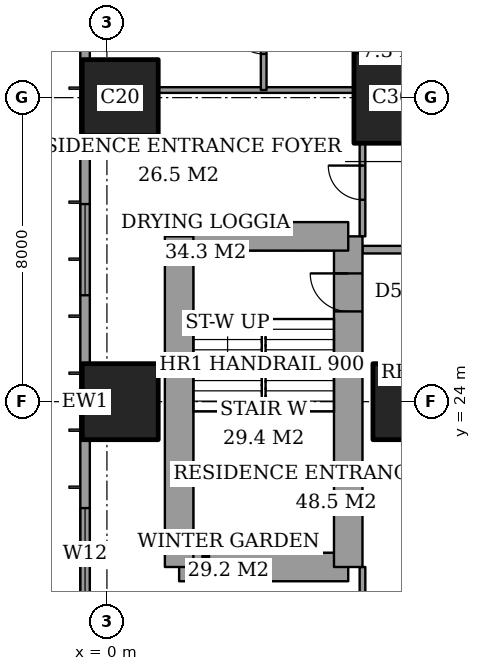
"""IFC4 building model, lengths in metres.
Left out: names, types, materials, properties, quantities, classifications, styles, units other than length and angle.
Written with IfcOpenShell. Run it as: python <this file> out.ifc"""

import sys

from ifc_helpers import new_model, si_unit, direction, frame, frame_2d, origin, origin_2d, place, context, subcontext, project, spatial, rectangle, extrude, element, fill, save


model = new_model("IFC4")
c1 = context("Model", 3, precision=1e-05, world=origin(), true_north=direction((0.0, 1.0)))
c2 = subcontext(c1, "Body", "Model", "MODEL_VIEW")
j1 = project(units=[si_unit("LENGTHUNIT", "METRE"), si_unit("PLANEANGLEUNIT", "RADIAN")], contexts=[c1])
p1 = place(None, origin())
s1 = spatial("IfcSite", under=j1, at=p1, CompositionType="ELEMENT")
p2 = place(p1, origin())
s2 = spatial("IfcBuilding", under=s1, at=p2, CompositionType="ELEMENT")
p3 = place(p2, frame((0.0, 0.0, 139.4)))
s3 = spatial("IfcBuildingStorey", under=s2, at=p3, CompositionType="ELEMENT", Elevation=139.4)
for number, where, z_axis, x_axis in (
    (1, (0.35, 24.0, 0.0), (0.0, 0.0, 1.0), (1.0, 0.0, 0.0)),
    (2, (0.35, 32.0, 0.0), (0.0, 0.0, 1.0), (1.0, 0.0, 0.0)),
    (3, (8.0, 24.0, 0.0), (0.0, 0.0, 1.0), (1.0, 0.0, 0.0)),
):
    element("IfcColumn", number, at=place(p3, frame(where, z_axis=z_axis, x_axis=x_axis)), inside=s3, PredefinedType="COLUMN", context=c2, shape_type="SweptSolid", body=[
        extrude(rectangle(XDim=2.0, YDim=2.0, at=origin_2d()), origin(), (0.0, 0.0, 1.0), 3.6),
    ])
p4 = place(p3, frame((8.0, 32.0, 0.0), z_axis=(0.0, 0.0, 1.0), x_axis=(1.0, 0.0, 0.0)))
e4 = element("IfcColumn", 4, at=p4, inside=s3, PredefinedType="COLUMN", context=c2, shape_type="SweptSolid", body=[
    extrude(rectangle(XDim=3.0, YDim=2.4, at=origin_2d()), origin(), (0.0, 0.0, 1.0), 3.6),
])
p5 = place(p3, frame((1.9, 19.65, 0.0), z_axis=(0.0, 0.0, 1.0), x_axis=(1.0, 0.0, 0.0)))
e5 = element("IfcWall", 5, at=p5, inside=s3, PredefinedType="SHEAR", context=c2, shape_type="SweptSolid", body=[
    extrude(rectangle(XDim=4.45, YDim=0.75, at=frame_2d((2.225, 0.0))), origin(), (0.0, 0.0, 1.0), 3.6),
])
p6 = place(p3, frame((6.35, 19.65, 0.0), z_axis=(0.0, 0.0, 1.0), x_axis=(0.0, 1.0, 0.0)))
e6 = element("IfcWall", 6, at=p6, inside=s3, PredefinedType="SHEAR", context=c2, shape_type="SweptSolid", body=[
    extrude(rectangle(XDim=8.7, YDim=0.75, at=frame_2d((4.35, 0.0))), origin(), (0.0, 0.0, 1.0), 3.6),
])
p7 = place(p6, frame((6.725, 0.0, 0.0)))
e7 = element("IfcOpeningElement", 7, at=p7, cuts=e6, PredefinedType="OPENING", context=c2, shape_type="SweptSolid", body=[
    extrude(rectangle(XDim=1.0, YDim=2.1, at=frame_2d((0.5, 1.05))), frame((0.0, 0.385, 0.0), z_axis=(0.0, -1.0, 0.0), x_axis=(1.0, 0.0, 0.0)), (0.0, 0.0, 1.0), 0.77),
])
p8 = place(p3, frame((6.35, 28.35, 0.0), z_axis=(0.0, 0.0, 1.0), x_axis=(-1.0, 0.0, 0.0)))
e8 = element("IfcWall", 8, at=p8, inside=s3, PredefinedType="SHEAR", context=c2, shape_type="SweptSolid", body=[
    extrude(rectangle(XDim=4.45, YDim=0.75, at=frame_2d((2.225, 0.0))), origin(), (0.0, 0.0, 1.0), 3.6),
])
p9 = place(p3, frame((1.9, 28.35, 0.0), z_axis=(0.0, 0.0, 1.0), x_axis=(0.0, -1.0, 0.0)))
e9 = element("IfcWall", 9, at=p9, inside=s3, PredefinedType="SHEAR", context=c2, shape_type="SweptSolid", body=[
    extrude(rectangle(XDim=8.7, YDim=0.75, at=frame_2d((4.35, 0.0))), origin(), (0.0, 0.0, 1.0), 3.6),
])
p10 = place(p3, frame((-0.575, 44.825, 0.0), z_axis=(0.0, 0.0, 1.0), x_axis=(0.0, -1.0, 0.0)))
e10 = element("IfcWall", 10, at=p10, inside=s3, PredefinedType="SOLIDWALL", context=c2, shape_type="SweptSolid", body=[
    extrude(rectangle(XDim=41.65, YDim=0.25, at=frame_2d((20.825, 0.0))), origin(), (0.0, 0.0, 1.0), 3.6),
])
p11 = place(p10, frame((0.775, 0.0, 0.4)))
e11 = element("IfcOpeningElement", 11, at=p11, cuts=e10, PredefinedType="OPENING", context=c2, shape_type="SweptSolid", body=[
    extrude(rectangle(XDim=2.4, YDim=2.2, at=frame_2d((1.2, 1.1))), frame((0.0, 0.135, 0.0), z_axis=(0.0, -1.0, 0.0), x_axis=(1.0, 0.0, 0.0)), (0.0, 0.0, 1.0), 0.27),
])
p12 = place(p10, frame((6.1, 0.0, 0.4)))
e12 = element("IfcOpeningElement", 12, at=p12, cuts=e10, PredefinedType="OPENING", context=c2, shape_type="SweptSolid", body=[
    extrude(rectangle(XDim=1.2, YDim=2.2, at=frame_2d((0.6, 1.1))), frame((0.0, 0.135, 0.0), z_axis=(0.0, -1.0, 0.0), x_axis=(1.0, 0.0, 0.0)), (0.0, 0.0, 1.0), 0.27),
])
p13 = place(p10, frame((8.425, 0.0, 0.4)))
e13 = element("IfcOpeningElement", 13, at=p13, cuts=e10, PredefinedType="OPENING", context=c2, shape_type="SweptSolid", body=[
    extrude(rectangle(XDim=2.4, YDim=2.2, at=frame_2d((1.2, 1.1))), frame((0.0, 0.135, 0.0), z_axis=(0.0, -1.0, 0.0), x_axis=(1.0, 0.0, 0.0)), (0.0, 0.0, 1.0), 0.27),
])
p14 = place(p10, frame((15.625, 0.0, 0.4)))
e14 = element("IfcOpeningElement", 14, at=p14, cuts=e10, PredefinedType="OPENING", context=c2, shape_type="SweptSolid", body=[
    extrude(rectangle(XDim=2.4, YDim=2.2, at=frame_2d((1.2, 1.1))), frame((0.0, 0.135, 0.0), z_axis=(0.0, -1.0, 0.0), x_axis=(1.0, 0.0, 0.0)), (0.0, 0.0, 1.0), 0.27),
])
p15 = place(p10, frame((23.625, 0.0, 0.4)))
e15 = element("IfcOpeningElement", 15, at=p15, cuts=e10, PredefinedType="OPENING", context=c2, shape_type="SweptSolid", body=[
    extrude(rectangle(XDim=2.4, YDim=2.2, at=frame_2d((1.2, 1.1))), frame((0.0, 0.135, 0.0), z_axis=(0.0, -1.0, 0.0), x_axis=(1.0, 0.0, 0.0)), (0.0, 0.0, 1.0), 0.27),
])
p16 = place(p10, frame((30.825, 0.0, 0.4)))
e16 = element("IfcOpeningElement", 16, at=p16, cuts=e10, PredefinedType="OPENING", context=c2, shape_type="SweptSolid", body=[
    extrude(rectangle(XDim=2.4, YDim=2.2, at=frame_2d((1.2, 1.1))), frame((0.0, 0.135, 0.0), z_axis=(0.0, -1.0, 0.0), x_axis=(1.0, 0.0, 0.0)), (0.0, 0.0, 1.0), 0.27),
])
p17 = place(p10, frame((34.5, 0.0, 0.4)))
e17 = element("IfcOpeningElement", 17, at=p17, cuts=e10, PredefinedType="OPENING", context=c2, shape_type="SweptSolid", body=[
    extrude(rectangle(XDim=1.2, YDim=2.2, at=frame_2d((0.6, 1.1))), frame((0.0, 0.135, 0.0), z_axis=(0.0, -1.0, 0.0), x_axis=(1.0, 0.0, 0.0)), (0.0, 0.0, 1.0), 0.27),
])
p18 = place(p10, frame((38.475, 0.0, 0.4)))
e18 = element("IfcOpeningElement", 18, at=p18, cuts=e10, PredefinedType="OPENING", context=c2, shape_type="SweptSolid", body=[
    extrude(rectangle(XDim=2.4, YDim=2.2, at=frame_2d((1.2, 1.1))), frame((0.0, 0.135, 0.0), z_axis=(0.0, -1.0, 0.0), x_axis=(1.0, 0.0, 0.0)), (0.0, 0.0, 1.0), 0.27),
])
p19 = place(p3, frame((6.725, 28.0, 0.0), z_axis=(0.0, 0.0, 1.0), x_axis=(1.0, 0.0, 0.0)))
e19 = element("IfcWall", 19, at=p19, inside=s3, PredefinedType="PARTITIONING", context=c2, shape_type="SweptSolid", body=[
    extrude(rectangle(XDim=17.275, YDim=0.2, at=frame_2d((8.637, 0.0))), origin(), (0.0, 0.0, 1.0), 3.35),
])
p20 = place(p19, frame((6.675, 0.0, 0.0)))
e20 = element("IfcOpeningElement", 20, at=p20, cuts=e19, PredefinedType="OPENING", context=c2, shape_type="SweptSolid", body=[
    extrude(rectangle(XDim=1.2, YDim=2.4, at=frame_2d((0.6, 1.2))), frame((0.0, 0.11, 0.0), z_axis=(0.0, -1.0, 0.0), x_axis=(1.0, 0.0, 0.0)), (0.0, 0.0, 1.0), 0.22),
])
p21 = place(p3, frame((1.35, 32.2, 0.0), z_axis=(0.0, 0.0, 1.0), x_axis=(1.0, 0.0, 0.0)))
e21 = element("IfcWall", 21, at=p21, inside=s3, PredefinedType="PARTITIONING", context=c2, shape_type="SweptSolid", body=[
    extrude(rectangle(XDim=5.15, YDim=0.15, at=frame_2d((2.575, 0.0))), origin(), (0.0, 0.0, 1.0), 3.35),
])
p22 = place(p3, frame((4.125, 32.2, 0.0), z_axis=(0.0, 0.0, 1.0), x_axis=(0.0, 1.0, 0.0)))
e22 = element("IfcWall", 22, at=p22, inside=s3, PredefinedType="PARTITIONING", context=c2, shape_type="SweptSolid", body=[
    extrude(rectangle(XDim=2.8, YDim=0.15, at=frame_2d((1.4, 0.0))), origin(), (0.0, 0.0, 1.0), 3.35),
])
p23 = place(p22, frame((0.95, 0.0, 0.0)))
e23 = element("IfcOpeningElement", 23, at=p23, cuts=e22, PredefinedType="OPENING", context=c2, shape_type="SweptSolid", body=[
    extrude(rectangle(XDim=0.9, YDim=2.1, at=frame_2d((0.45, 1.05))), frame((0.0, 0.085, 0.0), z_axis=(0.0, -1.0, 0.0), x_axis=(1.0, 0.0, 0.0)), (0.0, 0.0, 1.0), 0.17),
])
p24 = place(p3, frame((6.725, 17.2, 0.0), z_axis=(0.0, 0.0, 1.0), x_axis=(0.0, 1.0, 0.0)))
e24 = element("IfcWall", 24, at=p24, inside=s3, PredefinedType="PARTITIONING", context=c2, shape_type="SweptSolid", body=[
    extrude(rectangle(XDim=2.45, YDim=0.15, at=frame_2d((1.225, 0.0))), origin(), (0.0, 0.0, 1.0), 3.35),
])
p25 = place(p24, frame((0.538, 0.0, 0.0)))
e25 = element("IfcOpeningElement", 25, at=p25, cuts=e24, PredefinedType="OPENING", context=c2, shape_type="SweptSolid", body=[
    extrude(rectangle(XDim=1.0, YDim=2.1, at=frame_2d((0.5, 1.05))), frame((0.0, 0.085, 0.0), z_axis=(0.0, -1.0, 0.0), x_axis=(1.0, 0.0, 0.0)), (0.0, 0.0, 1.0), 0.17),
])
p26 = place(p3, frame((6.725, 28.35, 0.0), z_axis=(0.0, 0.0, 1.0), x_axis=(0.0, 1.0, 0.0)))
e26 = element("IfcWall", 26, at=p26, inside=s3, PredefinedType="PARTITIONING", context=c2, shape_type="SweptSolid", body=[
    extrude(rectangle(XDim=2.45, YDim=0.15, at=frame_2d((1.225, 0.0))), origin(), (0.0, 0.0, 1.0), 3.35),
])
p27 = place(p26, frame((0.962, 0.0, 0.0)))
e27 = element("IfcOpeningElement", 27, at=p27, cuts=e26, PredefinedType="OPENING", context=c2, shape_type="SweptSolid", body=[
    extrude(rectangle(XDim=0.9, YDim=2.1, at=frame_2d((0.45, 1.05))), frame((0.0, 0.085, 0.0), z_axis=(0.0, -1.0, 0.0), x_axis=(1.0, 0.0, 0.0)), (0.0, 0.0, 1.0), 0.17),
])
p28 = place(p14, origin())
e28 = element("IfcWindow", 28, at=p28, inside=s3, PartitioningType="SINGLE_PANEL", PredefinedType="WINDOW", context=c2, shape_type="SweptSolid", body=[
    extrude(rectangle(XDim=2.4, YDim=2.2, at=frame_2d((1.2, 1.1))), frame((0.0, 0.03, 0.0), z_axis=(0.0, -1.0, 0.0), x_axis=(1.0, 0.0, 0.0)), (0.0, 0.0, 1.0), 0.06),
])
fill(e14, e28)
p29 = place(p15, origin())
e29 = element("IfcWindow", 29, at=p29, inside=s3, PartitioningType="SINGLE_PANEL", PredefinedType="WINDOW", context=c2, shape_type="SweptSolid", body=[
    extrude(rectangle(XDim=2.4, YDim=2.2, at=frame_2d((1.2, 1.1))), frame((0.0, 0.03, 0.0), z_axis=(0.0, -1.0, 0.0), x_axis=(1.0, 0.0, 0.0)), (0.0, 0.0, 1.0), 0.06),
])
fill(e15, e29)
p30 = place(p23, origin())
e30 = element("IfcDoor", 30, at=p30, inside=s3, OperationType="SINGLE_SWING_LEFT", PredefinedType="DOOR", context=c2, shape_type="SweptSolid", body=[
    extrude(rectangle(XDim=0.9, YDim=2.1, at=frame_2d((0.45, 1.05))), frame((0.0, 0.025, 0.0), z_axis=(0.0, -1.0, 0.0), x_axis=(1.0, 0.0, 0.0)), (0.0, 0.0, 1.0), 0.05),
])
fill(e23, e30)
p31 = place(p27, origin())
e31 = element("IfcDoor", 31, at=p31, inside=s3, OperationType="SINGLE_SWING_LEFT", PredefinedType="DOOR", context=c2, shape_type="SweptSolid", body=[
    extrude(rectangle(XDim=0.9, YDim=2.1, at=frame_2d((0.45, 1.05))), frame((0.0, 0.025, 0.0), z_axis=(0.0, -1.0, 0.0), x_axis=(1.0, 0.0, 0.0)), (0.0, 0.0, 1.0), 0.05),
])
fill(e27, e31)
p32 = place(p7, origin())
e32 = element("IfcDoor", 32, at=p32, inside=s3, OperationType="SINGLE_SWING_LEFT", PredefinedType="DOOR", context=c2, shape_type="SweptSolid", body=[
    extrude(rectangle(XDim=1.0, YDim=2.1, at=frame_2d((0.5, 1.05))), frame((0.0, 0.025, 0.0), z_axis=(0.0, -1.0, 0.0), x_axis=(1.0, 0.0, 0.0)), (0.0, 0.0, 1.0), 0.05),
])
fill(e7, e32)
save(model, sys.argv[1])
